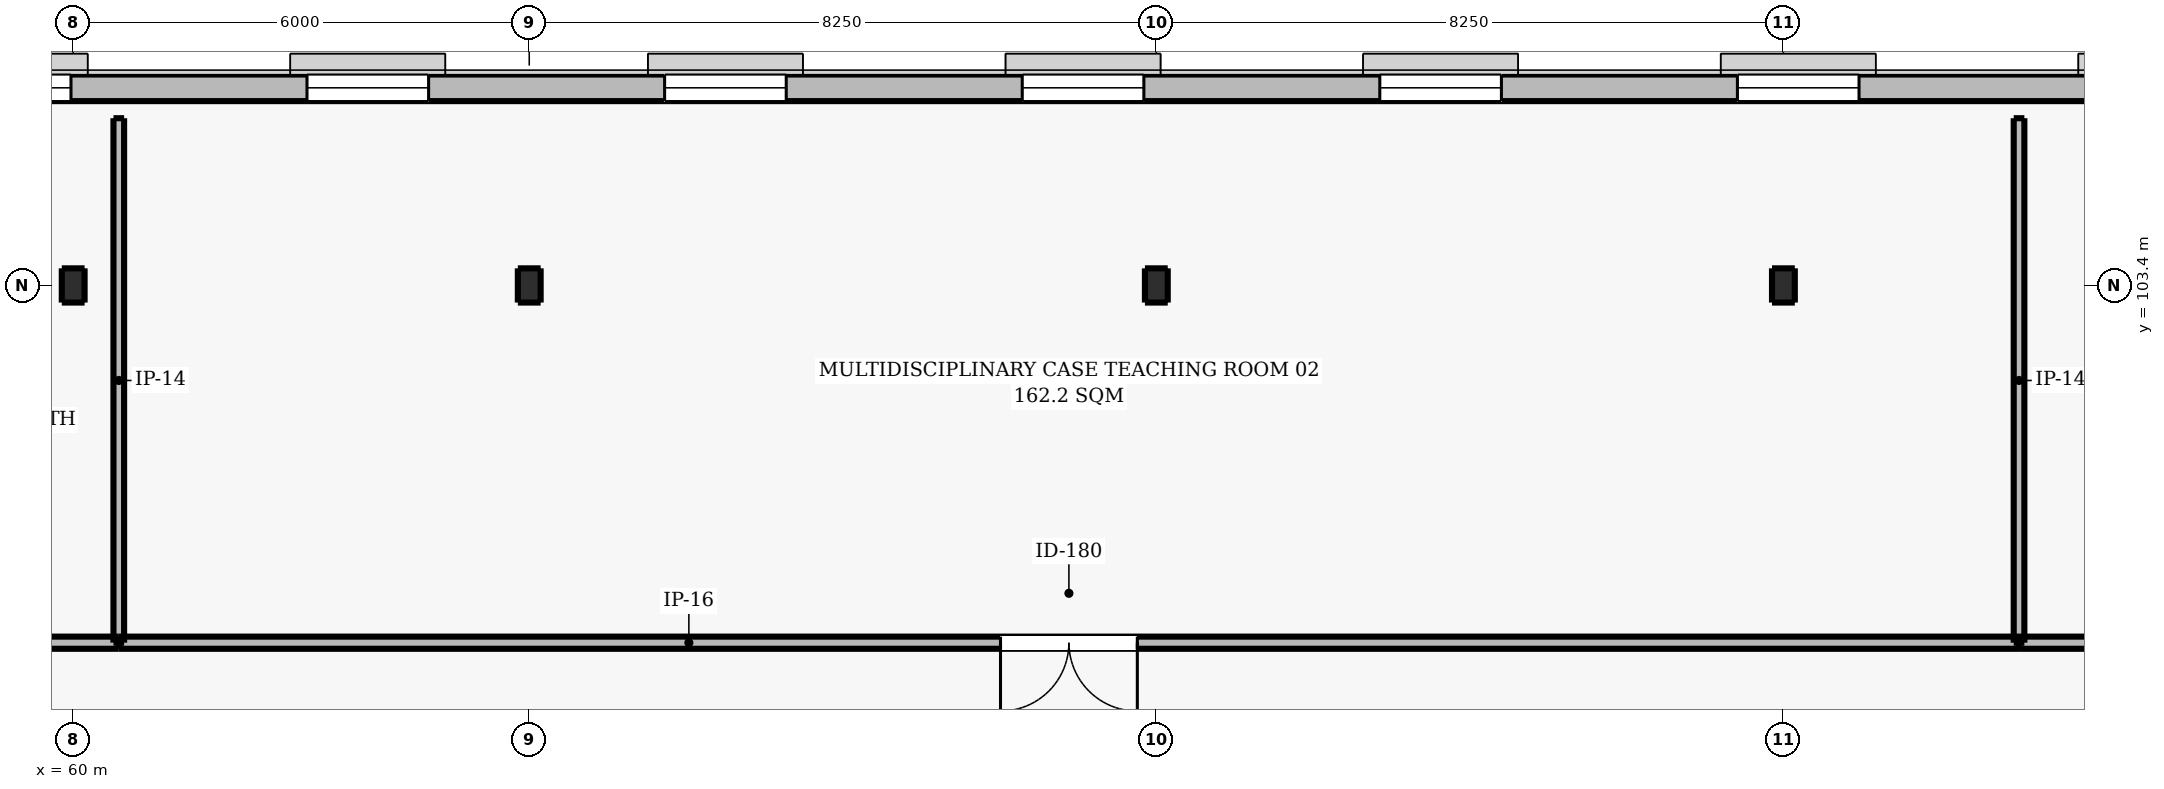
"""IFC4 building model, lengths in metres.
Left out: names, types, materials, properties, quantities, classifications, styles, units other than length and angle.
Written with IfcOpenShell. Run it as: python <this file> out.ifc"""

import sys

from ifc_helpers import new_model, si_unit, direction, frame, frame_2d, origin, origin_2d, place, context, subcontext, project, spatial, rectangle, i_section, extrude, element, fill, save


model = new_model("IFC4")
c1 = context("Model", 3, precision=1e-05, world=origin(), true_north=direction((0.0, 1.0)))
c2 = subcontext(c1, "Body", "Model", "MODEL_VIEW")
j1 = project(units=[si_unit("LENGTHUNIT", "METRE"), si_unit("PLANEANGLEUNIT", "RADIAN")], contexts=[c1])
p1 = place(None, origin())
s1 = spatial("IfcSite", under=j1, at=p1, CompositionType="ELEMENT")
p2 = place(p1, origin())
s2 = spatial("IfcBuilding", under=s1, at=p2, CompositionType="ELEMENT")
p3 = place(p2, frame((0.0, 0.0, 5.1)))
s3 = spatial("IfcBuildingStorey", under=s2, at=p3, CompositionType="ELEMENT", Elevation=5.1)
for number, where, z_axis, x_axis in (
    (1, (60.0, 103.4, 0.0), (0.0, 0.0, 1.0), (1.0, 0.0, 0.0)),
    (2, (66.0, 103.4, 0.0), (0.0, 0.0, 1.0), (1.0, 0.0, 0.0)),
    (3, (74.25, 103.4, 0.0), (0.0, 0.0, 1.0), (1.0, 0.0, 0.0)),
    (4, (82.5, 103.4, 0.0), (0.0, 0.0, 1.0), (1.0, 0.0, 0.0)),
):
    element("IfcColumn", number, at=place(p3, frame(where, z_axis=z_axis, x_axis=x_axis)), inside=s3, PredefinedType="COLUMN", context=c2, shape_type="SweptSolid", body=[
        extrude(i_section(OverallWidth=0.3, OverallDepth=0.45, WebThickness=0.014, FlangeThickness=0.026, FilletRadius=0.027, at=origin_2d()), origin(), (0.0, 0.0, 1.0), 4.5),
    ])
p4 = place(p3, frame((38.0, 106.0, 0.0), z_axis=(0.0, 0.0, 1.0), x_axis=(1.0, 0.0, 0.0)))
e5 = element("IfcWall", 5, at=p4, inside=s3, PredefinedType="SOLIDWALL", context=c2, shape_type="SweptSolid", body=[
    extrude(rectangle(XDim=98.8, YDim=0.35, at=frame_2d((49.4, 0.0))), origin(), (0.0, 0.0, 1.0), 4.21),
])
p5 = place(p4, frame((1.552, 0.0, 1.305)))
e6 = element("IfcOpeningElement", 6, at=p5, cuts=e5, PredefinedType="OPENING", context=c2, shape_type="SweptSolid", body=[
    extrude(rectangle(XDim=1.6, YDim=1.6, at=frame_2d((0.8, 0.8))), frame((0.0, 0.185, 0.0), z_axis=(0.0, -1.0, 0.0), x_axis=(1.0, 0.0, 0.0)), (0.0, 0.0, 1.0), 0.37),
])
p6 = place(p4, frame((6.257, 0.0, 1.305)))
e7 = element("IfcOpeningElement", 7, at=p6, cuts=e5, PredefinedType="OPENING", context=c2, shape_type="SweptSolid", body=[
    extrude(rectangle(XDim=1.6, YDim=1.6, at=frame_2d((0.8, 0.8))), frame((0.0, 0.185, 0.0), z_axis=(0.0, -1.0, 0.0), x_axis=(1.0, 0.0, 0.0)), (0.0, 0.0, 1.0), 0.37),
])
p7 = place(p4, frame((10.962, 0.0, 1.305)))
e8 = element("IfcOpeningElement", 8, at=p7, cuts=e5, PredefinedType="OPENING", context=c2, shape_type="SweptSolid", body=[
    extrude(rectangle(XDim=1.6, YDim=1.6, at=frame_2d((0.8, 0.8))), frame((0.0, 0.185, 0.0), z_axis=(0.0, -1.0, 0.0), x_axis=(1.0, 0.0, 0.0)), (0.0, 0.0, 1.0), 0.37),
])
p8 = place(p4, frame((15.667, 0.0, 1.305)))
e9 = element("IfcOpeningElement", 9, at=p8, cuts=e5, PredefinedType="OPENING", context=c2, shape_type="SweptSolid", body=[
    extrude(rectangle(XDim=1.6, YDim=1.6, at=frame_2d((0.8, 0.8))), frame((0.0, 0.185, 0.0), z_axis=(0.0, -1.0, 0.0), x_axis=(1.0, 0.0, 0.0)), (0.0, 0.0, 1.0), 0.37),
])
p9 = place(p4, frame((20.371, 0.0, 1.305)))
e10 = element("IfcOpeningElement", 10, at=p9, cuts=e5, PredefinedType="OPENING", context=c2, shape_type="SweptSolid", body=[
    extrude(rectangle(XDim=1.6, YDim=1.6, at=frame_2d((0.8, 0.8))), frame((0.0, 0.185, 0.0), z_axis=(0.0, -1.0, 0.0), x_axis=(1.0, 0.0, 0.0)), (0.0, 0.0, 1.0), 0.37),
])
p10 = place(p4, frame((25.076, 0.0, 1.305)))
e11 = element("IfcOpeningElement", 11, at=p10, cuts=e5, PredefinedType="OPENING", context=c2, shape_type="SweptSolid", body=[
    extrude(rectangle(XDim=1.6, YDim=1.6, at=frame_2d((0.8, 0.8))), frame((0.0, 0.185, 0.0), z_axis=(0.0, -1.0, 0.0), x_axis=(1.0, 0.0, 0.0)), (0.0, 0.0, 1.0), 0.37),
])
p11 = place(p4, frame((29.781, 0.0, 1.305)))
e12 = element("IfcOpeningElement", 12, at=p11, cuts=e5, PredefinedType="OPENING", context=c2, shape_type="SweptSolid", body=[
    extrude(rectangle(XDim=1.6, YDim=1.6, at=frame_2d((0.8, 0.8))), frame((0.0, 0.185, 0.0), z_axis=(0.0, -1.0, 0.0), x_axis=(1.0, 0.0, 0.0)), (0.0, 0.0, 1.0), 0.37),
])
p12 = place(p4, frame((34.486, 0.0, 1.305)))
e13 = element("IfcOpeningElement", 13, at=p12, cuts=e5, PredefinedType="OPENING", context=c2, shape_type="SweptSolid", body=[
    extrude(rectangle(XDim=1.6, YDim=1.6, at=frame_2d((0.8, 0.8))), frame((0.0, 0.185, 0.0), z_axis=(0.0, -1.0, 0.0), x_axis=(1.0, 0.0, 0.0)), (0.0, 0.0, 1.0), 0.37),
])
p13 = place(p4, frame((39.19, 0.0, 1.305)))
e14 = element("IfcOpeningElement", 14, at=p13, cuts=e5, PredefinedType="OPENING", context=c2, shape_type="SweptSolid", body=[
    extrude(rectangle(XDim=1.6, YDim=1.6, at=frame_2d((0.8, 0.8))), frame((0.0, 0.185, 0.0), z_axis=(0.0, -1.0, 0.0), x_axis=(1.0, 0.0, 0.0)), (0.0, 0.0, 1.0), 0.37),
])
p14 = place(p4, frame((43.895, 0.0, 1.305)))
e15 = element("IfcOpeningElement", 15, at=p14, cuts=e5, PredefinedType="OPENING", context=c2, shape_type="SweptSolid", body=[
    extrude(rectangle(XDim=1.6, YDim=1.6, at=frame_2d((0.8, 0.8))), frame((0.0, 0.185, 0.0), z_axis=(0.0, -1.0, 0.0), x_axis=(1.0, 0.0, 0.0)), (0.0, 0.0, 1.0), 0.37),
])
p15 = place(p4, frame((48.6, 0.0, 1.305)))
e16 = element("IfcOpeningElement", 16, at=p15, cuts=e5, PredefinedType="OPENING", context=c2, shape_type="SweptSolid", body=[
    extrude(rectangle(XDim=1.6, YDim=1.6, at=frame_2d((0.8, 0.8))), frame((0.0, 0.185, 0.0), z_axis=(0.0, -1.0, 0.0), x_axis=(1.0, 0.0, 0.0)), (0.0, 0.0, 1.0), 0.37),
])
p16 = place(p4, frame((53.305, 0.0, 1.305)))
e17 = element("IfcOpeningElement", 17, at=p16, cuts=e5, PredefinedType="OPENING", context=c2, shape_type="SweptSolid", body=[
    extrude(rectangle(XDim=1.6, YDim=1.6, at=frame_2d((0.8, 0.8))), frame((0.0, 0.185, 0.0), z_axis=(0.0, -1.0, 0.0), x_axis=(1.0, 0.0, 0.0)), (0.0, 0.0, 1.0), 0.37),
])
p17 = place(p4, frame((58.01, 0.0, 1.305)))
e18 = element("IfcOpeningElement", 18, at=p17, cuts=e5, PredefinedType="OPENING", context=c2, shape_type="SweptSolid", body=[
    extrude(rectangle(XDim=1.6, YDim=1.6, at=frame_2d((0.8, 0.8))), frame((0.0, 0.185, 0.0), z_axis=(0.0, -1.0, 0.0), x_axis=(1.0, 0.0, 0.0)), (0.0, 0.0, 1.0), 0.37),
])
p18 = place(p4, frame((62.714, 0.0, 1.305)))
e19 = element("IfcOpeningElement", 19, at=p18, cuts=e5, PredefinedType="OPENING", context=c2, shape_type="SweptSolid", body=[
    extrude(rectangle(XDim=1.6, YDim=1.6, at=frame_2d((0.8, 0.8))), frame((0.0, 0.185, 0.0), z_axis=(0.0, -1.0, 0.0), x_axis=(1.0, 0.0, 0.0)), (0.0, 0.0, 1.0), 0.37),
])
p19 = place(p4, frame((67.419, 0.0, 1.305)))
e20 = element("IfcOpeningElement", 20, at=p19, cuts=e5, PredefinedType="OPENING", context=c2, shape_type="SweptSolid", body=[
    extrude(rectangle(XDim=1.6, YDim=1.6, at=frame_2d((0.8, 0.8))), frame((0.0, 0.185, 0.0), z_axis=(0.0, -1.0, 0.0), x_axis=(1.0, 0.0, 0.0)), (0.0, 0.0, 1.0), 0.37),
])
p20 = place(p4, frame((76.829, 0.0, 1.305)))
e21 = element("IfcOpeningElement", 21, at=p20, cuts=e5, PredefinedType="OPENING", context=c2, shape_type="SweptSolid", body=[
    extrude(rectangle(XDim=1.6, YDim=1.6, at=frame_2d((0.8, 0.8))), frame((0.0, 0.185, 0.0), z_axis=(0.0, -1.0, 0.0), x_axis=(1.0, 0.0, 0.0)), (0.0, 0.0, 1.0), 0.37),
])
p21 = place(p4, frame((81.533, 0.0, 1.305)))
e22 = element("IfcOpeningElement", 22, at=p21, cuts=e5, PredefinedType="OPENING", context=c2, shape_type="SweptSolid", body=[
    extrude(rectangle(XDim=1.6, YDim=1.6, at=frame_2d((0.8, 0.8))), frame((0.0, 0.185, 0.0), z_axis=(0.0, -1.0, 0.0), x_axis=(1.0, 0.0, 0.0)), (0.0, 0.0, 1.0), 0.37),
])
p22 = place(p4, frame((86.238, 0.0, 1.305)))
e23 = element("IfcOpeningElement", 23, at=p22, cuts=e5, PredefinedType="OPENING", context=c2, shape_type="SweptSolid", body=[
    extrude(rectangle(XDim=1.6, YDim=1.6, at=frame_2d((0.8, 0.8))), frame((0.0, 0.185, 0.0), z_axis=(0.0, -1.0, 0.0), x_axis=(1.0, 0.0, 0.0)), (0.0, 0.0, 1.0), 0.37),
])
p23 = place(p4, frame((90.943, 0.0, 1.305)))
e24 = element("IfcOpeningElement", 24, at=p23, cuts=e5, PredefinedType="OPENING", context=c2, shape_type="SweptSolid", body=[
    extrude(rectangle(XDim=1.6, YDim=1.6, at=frame_2d((0.8, 0.8))), frame((0.0, 0.185, 0.0), z_axis=(0.0, -1.0, 0.0), x_axis=(1.0, 0.0, 0.0)), (0.0, 0.0, 1.0), 0.37),
])
p24 = place(p4, frame((95.648, 0.0, 1.305)))
e25 = element("IfcOpeningElement", 25, at=p24, cuts=e5, PredefinedType="OPENING", context=c2, shape_type="SweptSolid", body=[
    extrude(rectangle(XDim=1.6, YDim=1.6, at=frame_2d((0.8, 0.8))), frame((0.0, 0.185, 0.0), z_axis=(0.0, -1.0, 0.0), x_axis=(1.0, 0.0, 0.0)), (0.0, 0.0, 1.0), 0.37),
])
p25 = place(p3, frame((35.6, 98.7, 0.0), z_axis=(0.0, 0.0, 1.0), x_axis=(1.0, 0.0, 0.0)))
e26 = element("IfcWall", 26, at=p25, inside=s3, PredefinedType="PARTITIONING", context=c2, shape_type="SweptSolid", body=[
    extrude(rectangle(XDim=25.0, YDim=0.16, at=frame_2d((12.5, 0.0))), origin(), (0.0, 0.0, 1.0), 4.21),
])
p26 = place(p25, frame((11.6, 0.0, 0.0)))
e27 = element("IfcOpeningElement", 27, at=p26, cuts=e26, PredefinedType="OPENING", context=c2, shape_type="SweptSolid", body=[
    extrude(rectangle(XDim=1.8, YDim=2.25, at=frame_2d((0.9, 1.125))), frame((0.0, 0.09, 0.0), z_axis=(0.0, -1.0, 0.0), x_axis=(1.0, 0.0, 0.0)), (0.0, 0.0, 1.0), 0.18),
])
p27 = place(p3, frame((60.6, 98.7, 0.0), z_axis=(0.0, 0.0, 1.0), x_axis=(0.0, 1.0, 0.0)))
e28 = element("IfcWall", 28, at=p27, inside=s3, PredefinedType="PARTITIONING", context=c2, shape_type="SweptSolid", body=[
    extrude(rectangle(XDim=6.9, YDim=0.14, at=frame_2d((3.45, 0.0))), origin(), (0.0, 0.0, 1.0), 4.21),
])
p28 = place(p3, frame((60.6, 98.7, 0.0), z_axis=(0.0, 0.0, 1.0), x_axis=(1.0, 0.0, 0.0)))
e29 = element("IfcWall", 29, at=p28, inside=s3, PredefinedType="PARTITIONING", context=c2, shape_type="SweptSolid", body=[
    extrude(rectangle(XDim=25.0, YDim=0.16, at=frame_2d((12.5, 0.0))), origin(), (0.0, 0.0, 1.0), 4.21),
])
p29 = place(p28, frame((11.6, 0.0, 0.0)))
e30 = element("IfcOpeningElement", 30, at=p29, cuts=e29, PredefinedType="OPENING", context=c2, shape_type="SweptSolid", body=[
    extrude(rectangle(XDim=1.8, YDim=2.25, at=frame_2d((0.9, 1.125))), frame((0.0, 0.09, 0.0), z_axis=(0.0, -1.0, 0.0), x_axis=(1.0, 0.0, 0.0)), (0.0, 0.0, 1.0), 0.18),
])
p30 = place(p3, frame((85.6, 98.7, 0.0), z_axis=(0.0, 0.0, 1.0), x_axis=(0.0, 1.0, 0.0)))
e31 = element("IfcWall", 31, at=p30, inside=s3, PredefinedType="PARTITIONING", context=c2, shape_type="SweptSolid", body=[
    extrude(rectangle(XDim=6.9, YDim=0.14, at=frame_2d((3.45, 0.0))), origin(), (0.0, 0.0, 1.0), 4.21),
])
p31 = place(p3, frame((85.6, 98.7, 0.0), z_axis=(0.0, 0.0, 1.0), x_axis=(1.0, 0.0, 0.0)))
e32 = element("IfcWall", 32, at=p31, inside=s3, PredefinedType="PARTITIONING", context=c2, shape_type="SweptSolid", body=[
    extrude(rectangle(XDim=25.9, YDim=0.16, at=frame_2d((12.95, 0.0))), origin(), (0.0, 0.0, 1.0), 4.21),
])
p32 = place(p31, frame((12.4, 0.0, 0.0)))
e33 = element("IfcOpeningElement", 33, at=p32, cuts=e32, PredefinedType="OPENING", context=c2, shape_type="SweptSolid", body=[
    extrude(rectangle(XDim=1.1, YDim=2.15, at=frame_2d((0.55, 1.075))), frame((0.0, 0.09, 0.0), z_axis=(0.0, -1.0, 0.0), x_axis=(1.0, 0.0, 0.0)), (0.0, 0.0, 1.0), 0.18),
])
p33 = place(p9, origin())
e34 = element("IfcWindow", 34, at=p33, inside=s3, PartitioningType="SINGLE_PANEL", PredefinedType="WINDOW", context=c2, shape_type="SweptSolid", body=[
    extrude(rectangle(XDim=1.6, YDim=1.6, at=frame_2d((0.8, 0.8))), frame((0.0, 0.03, 0.0), z_axis=(0.0, -1.0, 0.0), x_axis=(1.0, 0.0, 0.0)), (0.0, 0.0, 1.0), 0.06),
])
fill(e10, e34)
p34 = place(p10, origin())
e35 = element("IfcWindow", 35, at=p34, inside=s3, PartitioningType="SINGLE_PANEL", PredefinedType="WINDOW", context=c2, shape_type="SweptSolid", body=[
    extrude(rectangle(XDim=1.6, YDim=1.6, at=frame_2d((0.8, 0.8))), frame((0.0, 0.03, 0.0), z_axis=(0.0, -1.0, 0.0), x_axis=(1.0, 0.0, 0.0)), (0.0, 0.0, 1.0), 0.06),
])
fill(e11, e35)
p35 = place(p11, origin())
e36 = element("IfcWindow", 36, at=p35, inside=s3, PartitioningType="SINGLE_PANEL", PredefinedType="WINDOW", context=c2, shape_type="SweptSolid", body=[
    extrude(rectangle(XDim=1.6, YDim=1.6, at=frame_2d((0.8, 0.8))), frame((0.0, 0.03, 0.0), z_axis=(0.0, -1.0, 0.0), x_axis=(1.0, 0.0, 0.0)), (0.0, 0.0, 1.0), 0.06),
])
fill(e12, e36)
p36 = place(p12, origin())
e37 = element("IfcWindow", 37, at=p36, inside=s3, PartitioningType="SINGLE_PANEL", PredefinedType="WINDOW", context=c2, shape_type="SweptSolid", body=[
    extrude(rectangle(XDim=1.6, YDim=1.6, at=frame_2d((0.8, 0.8))), frame((0.0, 0.03, 0.0), z_axis=(0.0, -1.0, 0.0), x_axis=(1.0, 0.0, 0.0)), (0.0, 0.0, 1.0), 0.06),
])
fill(e13, e37)
p37 = place(p13, origin())
e38 = element("IfcWindow", 38, at=p37, inside=s3, PartitioningType="SINGLE_PANEL", PredefinedType="WINDOW", context=c2, shape_type="SweptSolid", body=[
    extrude(rectangle(XDim=1.6, YDim=1.6, at=frame_2d((0.8, 0.8))), frame((0.0, 0.03, 0.0), z_axis=(0.0, -1.0, 0.0), x_axis=(1.0, 0.0, 0.0)), (0.0, 0.0, 1.0), 0.06),
])
fill(e14, e38)
p38 = place(p14, origin())
e39 = element("IfcWindow", 39, at=p38, inside=s3, PartitioningType="SINGLE_PANEL", PredefinedType="WINDOW", context=c2, shape_type="SweptSolid", body=[
    extrude(rectangle(XDim=1.6, YDim=1.6, at=frame_2d((0.8, 0.8))), frame((0.0, 0.03, 0.0), z_axis=(0.0, -1.0, 0.0), x_axis=(1.0, 0.0, 0.0)), (0.0, 0.0, 1.0), 0.06),
])
fill(e15, e39)
p39 = place(p29, frame((1.8, 0.0, 0.0), z_axis=(0.0, 0.0, 1.0), x_axis=(-1.0, 0.0, 0.0)))
e40 = element("IfcDoor", 40, at=p39, inside=s3, OperationType="DOUBLE_DOOR_SINGLE_SWING", PredefinedType="DOOR", context=c2, shape_type="SweptSolid", body=[
    extrude(rectangle(XDim=1.8, YDim=2.25, at=frame_2d((0.9, 1.125))), frame((0.0, 0.025, 0.0), z_axis=(0.0, -1.0, 0.0), x_axis=(1.0, 0.0, 0.0)), (0.0, 0.0, 1.0), 0.05),
])
fill(e30, e40)
save(model, sys.argv[1])
